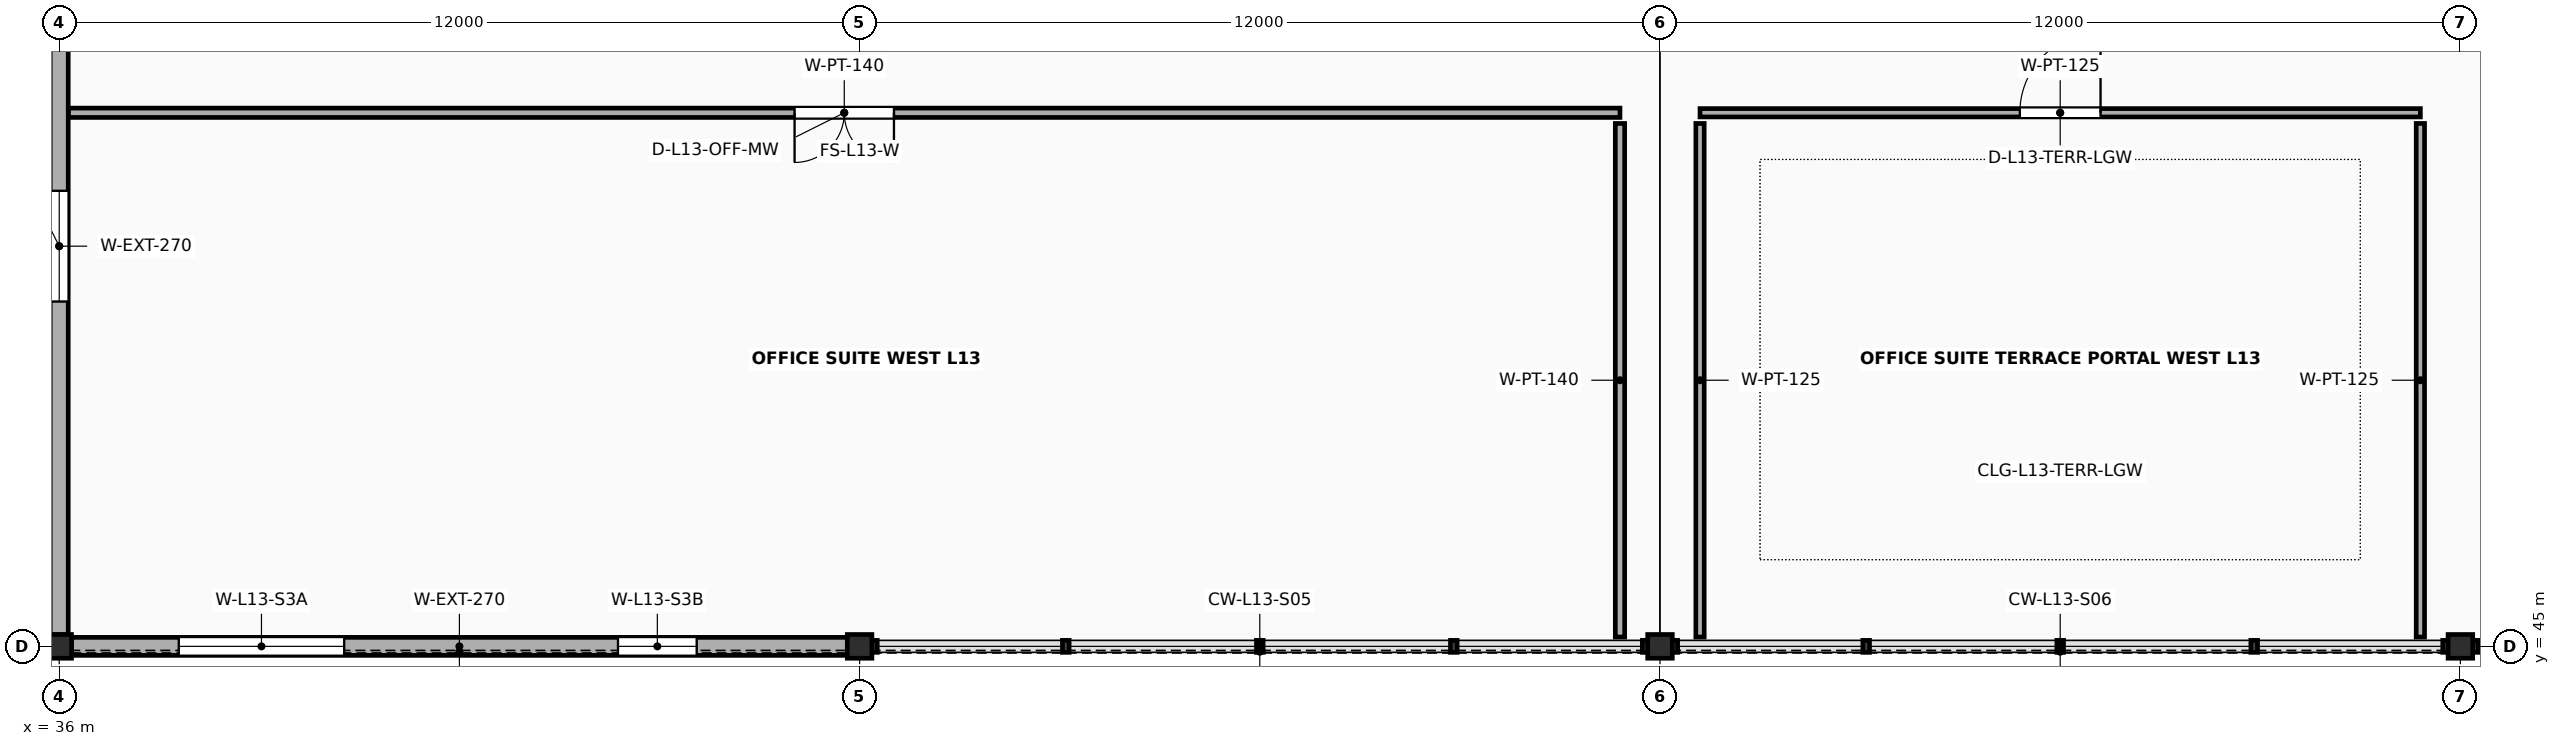
"""IFC4 building model, lengths in metres.
Left out: names, types, materials, properties, quantities, classifications, styles, units other than length and angle.
Written with IfcOpenShell. Run it as: python <this file> out.ifc"""

import sys

from ifc_helpers import new_model, si_unit, direction, frame, frame_2d, origin, origin_2d, place, context, subcontext, project, spatial, rectangle, i_section, extrude, element, fill, save


model = new_model("IFC4")
c1 = context("Model", 3, precision=1e-05, world=origin(), true_north=direction((0.0, 1.0)))
c2 = subcontext(c1, "Body", "Model", "MODEL_VIEW")
j1 = project(units=[si_unit("LENGTHUNIT", "METRE"), si_unit("PLANEANGLEUNIT", "RADIAN")], contexts=[c1])
p1 = place(None, origin())
s1 = spatial("IfcSite", under=j1, at=p1, CompositionType="ELEMENT")
p2 = place(p1, origin())
s2 = spatial("IfcBuilding", under=s1, at=p2, CompositionType="ELEMENT")
p3 = place(p2, frame((0.0, 0.0, 53.6)))
s3 = spatial("IfcBuildingStorey", under=s2, at=p3, CompositionType="ELEMENT", Elevation=53.6)
for number, where, z_axis, x_axis in (
    (1, (36.0, 45.0, 0.0), (0.0, 0.0, 1.0), (1.0, 0.0, 0.0)),
    (2, (48.0, 45.0, 0.0), (0.0, 0.0, 1.0), (1.0, 0.0, 0.0)),
    (3, (60.0, 45.0, 0.0), (0.0, 0.0, 1.0), (1.0, 0.0, 0.0)),
    (4, (72.0, 45.0, 0.0), (0.0, 0.0, 1.0), (1.0, 0.0, 0.0)),
):
    element("IfcColumn", number, at=place(p3, frame(where, z_axis=z_axis, x_axis=x_axis)), inside=s3, PredefinedType="COLUMN", context=c2, shape_type="SweptSolid", body=[
        extrude(i_section(OverallWidth=0.369, OverallDepth=0.356, WebThickness=0.011, FlangeThickness=0.018, FilletRadius=0.018, at=origin_2d()), origin(), (0.0, 0.0, 1.0), 4.0),
    ])
p4 = place(p3, frame((36.183, 45.0, 0.0), z_axis=(0.0, 0.0, 1.0), x_axis=(1.0, 0.0, 0.0)))
e5 = element("IfcWall", 5, at=p4, inside=s3, PredefinedType="SOLIDWALL", context=c2, shape_type="SweptSolid", body=[
    extrude(rectangle(XDim=11.635, YDim=0.27, at=frame_2d((5.817, 0.0))), origin(), (0.0, 0.0, 1.0), 3.271),
])
p5 = place(p4, frame((1.61, 0.0, 0.78)))
e6 = element("IfcOpeningElement", 6, at=p5, cuts=e5, PredefinedType="OPENING", context=c2, shape_type="SweptSolid", body=[
    extrude(rectangle(XDim=2.48, YDim=1.42, at=frame_2d((1.24, 0.71))), frame((0.0, 0.15, 0.0), z_axis=(0.0, -1.0, 0.0), x_axis=(1.0, 0.0, 0.0)), (0.0, 0.0, 1.0), 0.3),
])
p6 = place(p4, frame((8.195, 0.0, 0.78)))
e7 = element("IfcOpeningElement", 7, at=p6, cuts=e5, PredefinedType="OPENING", context=c2, shape_type="SweptSolid", body=[
    extrude(rectangle(XDim=1.18, YDim=1.58, at=frame_2d((0.59, 0.79))), frame((0.0, 0.15, 0.0), z_axis=(0.0, -1.0, 0.0), x_axis=(1.0, 0.0, 0.0)), (0.0, 0.0, 1.0), 0.3),
])
p7 = place(p3, frame((36.0, 45.176, 0.0), z_axis=(0.0, 0.0, 1.0), x_axis=(0.0, 1.0, 0.0)))
e8 = element("IfcWall", 8, at=p7, inside=s3, PredefinedType="SOLIDWALL", context=c2, shape_type="SweptSolid", body=[
    extrude(rectangle(XDim=11.648, YDim=0.27, at=frame_2d((5.824, 0.0))), origin(), (0.0, 0.0, 1.0), 3.271),
])
p8 = place(p7, frame((4.994, 0.0, 0.78)))
e9 = element("IfcOpeningElement", 9, at=p8, cuts=e8, PredefinedType="OPENING", context=c2, shape_type="SweptSolid", body=[
    extrude(rectangle(XDim=1.66, YDim=1.58, at=frame_2d((0.83, 0.79))), frame((0.0, 0.15, 0.0), z_axis=(0.0, -1.0, 0.0), x_axis=(1.0, 0.0, 0.0)), (0.0, 0.0, 1.0), 0.3),
])
p9 = place(p3, frame((36.14, 53.0, 0.0), z_axis=(0.0, 0.0, 1.0), x_axis=(1.0, 0.0, 0.0)))
e10 = element("IfcWall", 10, at=p9, inside=s3, PredefinedType="PARTITIONING", context=c2, shape_type="SweptSolid", body=[
    extrude(rectangle(XDim=23.26, YDim=0.14, at=frame_2d((11.63, 0.0))), origin(), (0.0, 0.0, 1.0), 2.88),
])
p10 = place(p9, frame((10.885, 0.0, 0.0)))
e11 = element("IfcOpeningElement", 11, at=p10, cuts=e10, PredefinedType="OPENING", context=c2, shape_type="SweptSolid", body=[
    extrude(rectangle(XDim=1.49, YDim=2.28, at=frame_2d((0.745, 1.14))), frame((0.0, 0.085, 0.0), z_axis=(0.0, -1.0, 0.0), x_axis=(1.0, 0.0, 0.0)), (0.0, 0.0, 1.0), 0.17),
])
p11 = place(p3, frame((59.4, 45.14, 0.0), z_axis=(0.0, 0.0, 1.0), x_axis=(0.0, 1.0, 0.0)))
e12 = element("IfcWall", 12, at=p11, inside=s3, PredefinedType="PARTITIONING", context=c2, shape_type="SweptSolid", body=[
    extrude(rectangle(XDim=7.7, YDim=0.14, at=frame_2d((3.85, 0.0))), origin(), (0.0, 0.0, 1.0), 2.88),
])
p12 = place(p3, frame((60.6, 53.0, 0.0), z_axis=(0.0, 0.0, 1.0), x_axis=(1.0, 0.0, 0.0)))
e13 = element("IfcWall", 13, at=p12, inside=s3, PredefinedType="PARTITIONING", context=c2, shape_type="SweptSolid", body=[
    extrude(rectangle(XDim=10.8, YDim=0.125, at=frame_2d((5.4, 0.0))), origin(), (0.0, 0.0, 1.0), 2.88),
])
p13 = place(p12, frame((4.795, 0.0, 0.0)))
e14 = element("IfcOpeningElement", 14, at=p13, cuts=e13, PredefinedType="OPENING", context=c2, shape_type="SweptSolid", body=[
    extrude(rectangle(XDim=1.21, YDim=2.25, at=frame_2d((0.605, 1.125))), frame((0.0, 0.077, 0.0), z_axis=(0.0, -1.0, 0.0), x_axis=(1.0, 0.0, 0.0)), (0.0, 0.0, 1.0), 0.155),
])
for number, where, z_axis, x_axis in (
    (15, (60.6, 45.14, 0.0), (0.0, 0.0, 1.0), (0.0, 1.0, 0.0)),
    (16, (71.4, 45.14, 0.0), (0.0, 0.0, 1.0), (0.0, 1.0, 0.0)),
):
    element("IfcWall", number, at=place(p3, frame(where, z_axis=z_axis, x_axis=x_axis)), inside=s3, PredefinedType="PARTITIONING", context=c2, shape_type="SweptSolid", body=[
        extrude(rectangle(XDim=7.7, YDim=0.125, at=frame_2d((3.85, 0.0))), origin(), (0.0, 0.0, 1.0), 2.88),
    ])
p14 = place(p5, origin())
e17 = element("IfcWindow", 17, at=p14, inside=s3, PartitioningType="DOUBLE_PANEL_VERTICAL", PredefinedType="WINDOW", context=c2, shape_type="SweptSolid", body=[
    extrude(rectangle(XDim=2.48, YDim=1.42, at=frame_2d((1.24, 0.71))), frame((0.0, 0.03, 0.0), z_axis=(0.0, -1.0, 0.0), x_axis=(1.0, 0.0, 0.0)), (0.0, 0.0, 1.0), 0.06),
])
fill(e6, e17)
p15 = place(p6, origin())
e18 = element("IfcWindow", 18, at=p15, inside=s3, PartitioningType="SINGLE_PANEL", PredefinedType="WINDOW", context=c2, shape_type="SweptSolid", body=[
    extrude(rectangle(XDim=1.18, YDim=1.58, at=frame_2d((0.59, 0.79))), frame((0.0, 0.03, 0.0), z_axis=(0.0, -1.0, 0.0), x_axis=(1.0, 0.0, 0.0)), (0.0, 0.0, 1.0), 0.06),
])
fill(e7, e18)
p16 = place(p8, origin())
e19 = element("IfcWindow", 19, at=p16, inside=s3, PartitioningType="SINGLE_PANEL", PredefinedType="WINDOW", context=c2, shape_type="SweptSolid", body=[
    extrude(rectangle(XDim=1.66, YDim=1.58, at=frame_2d((0.83, 0.79))), frame((0.0, 0.03, 0.0), z_axis=(0.0, -1.0, 0.0), x_axis=(1.0, 0.0, 0.0)), (0.0, 0.0, 1.0), 0.06),
])
fill(e9, e19)
p17 = place(p10, origin())
e20 = element("IfcDoor", 20, at=p17, inside=s3, OperationType="DOUBLE_DOOR_SINGLE_SWING", PredefinedType="DOOR", context=c2, shape_type="SweptSolid", body=[
    extrude(rectangle(XDim=1.49, YDim=2.28, at=frame_2d((0.745, 1.14))), frame((0.0, 0.025, 0.0), z_axis=(0.0, -1.0, 0.0), x_axis=(1.0, 0.0, 0.0)), (0.0, 0.0, 1.0), 0.05),
])
fill(e11, e20)
p18 = place(p13, origin())
e21 = element("IfcDoor", 21, at=p18, inside=s3, OperationType="SINGLE_SWING_RIGHT", PredefinedType="DOOR", context=c2, shape_type="SweptSolid", body=[
    extrude(rectangle(XDim=1.21, YDim=2.25, at=frame_2d((0.605, 1.125))), frame((0.0, 0.025, 0.0), z_axis=(0.0, -1.0, 0.0), x_axis=(1.0, 0.0, 0.0)), (0.0, 0.0, 1.0), 0.05),
])
fill(e14, e21)
save(model, sys.argv[1])
